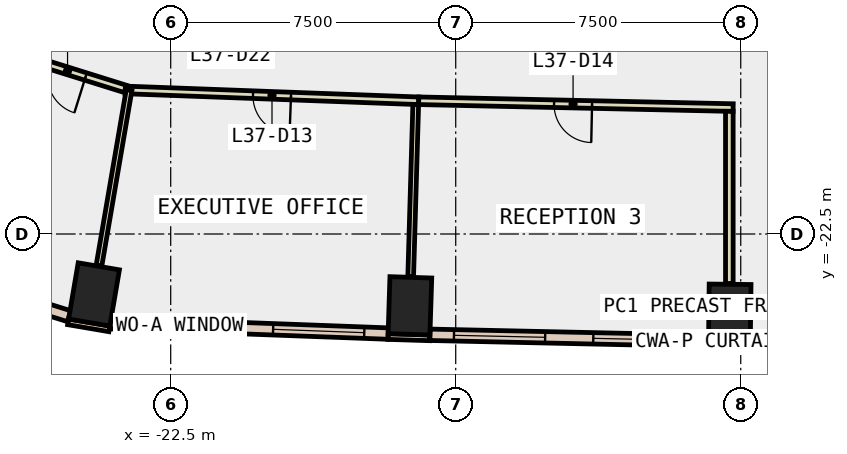
"""IFC4 building model, lengths in metres.
Left out: names, types, materials, properties, quantities, classifications, styles, units other than length and angle.
Written with IfcOpenShell. Run it as: python <this file> out.ifc"""

import sys

from ifc_helpers import new_model, si_unit, direction, frame, frame_2d, origin, origin_2d, place, context, subcontext, project, spatial, rectangle, extrude, element, fill, save


model = new_model("IFC4")
c1 = context("Model", 3, precision=1e-05, world=origin(), true_north=direction((0.0, 1.0)))
c2 = subcontext(c1, "Body", "Model", "MODEL_VIEW")
j1 = project(units=[si_unit("LENGTHUNIT", "METRE"), si_unit("PLANEANGLEUNIT", "RADIAN")], contexts=[c1])
p1 = place(None, origin())
s1 = spatial("IfcSite", under=j1, at=p1, CompositionType="ELEMENT")
p2 = place(p1, origin())
s2 = spatial("IfcBuilding", under=s1, at=p2, CompositionType="ELEMENT")
p3 = place(p2, frame((0.0, 0.0, 167.6)))
s3 = spatial("IfcBuildingStorey", under=s2, at=p3, CompositionType="ELEMENT", Elevation=167.6)
for number, where, z_axis, x_axis in (
    (1, (-24.518, -24.09, -0.4), (0.0, 0.0, 1.0), (-0.986, 0.168, 0.0)),
    (2, (-16.205, -24.39, -0.4), (0.0, 0.0, 1.0), (-0.999, 0.032, 0.0)),
    (3, (-7.789, -24.573, -0.4), (0.0, 0.0, 1.0), (-1.0, 0.012, 0.0)),
):
    element("IfcColumn", number, at=place(p3, frame(where, z_axis=z_axis, x_axis=x_axis)), inside=s3, PredefinedType="COLUMN", context=c2, shape_type="SweptSolid", body=[
        extrude(rectangle(XDim=1.1, YDim=1.5, at=origin_2d()), origin(), (0.0, 0.0, 1.0), 4.2),
    ])
p4 = place(p3, frame((-25.199, -24.811, 0.0), z_axis=(0.0, 0.0, 1.0), x_axis=(0.985763338892, -0.168138751323, 0.0)))
e4 = element("IfcWall", 4, at=p4, inside=s3, PredefinedType="STANDARD", context=c2, shape_type="SweptSolid", body=[
    extrude(rectangle(XDim=1.101, YDim=0.15, at=frame_2d((0.55, 0.0))), origin(), (0.0, 0.0, 1.0), 3.8),
])
p5 = place(p3, frame((-16.781, -25.198, 0.0), z_axis=(0.0, 0.0, 1.0), x_axis=(0.999523702549, -0.030860460829, 0.0)))
e5 = element("IfcWall", 5, at=p5, inside=s3, PredefinedType="STANDARD", context=c2, shape_type="SweptSolid", body=[
    extrude(rectangle(XDim=1.1, YDim=0.15, at=frame_2d((0.55, 0.0))), origin(), (0.0, 0.0, 1.0), 3.8),
])
p6 = place(p3, frame((-8.349, -25.392, 0.0), z_axis=(0.0, 0.0, 1.0), x_axis=(0.999940879068, -0.010873746799, 0.0)))
e6 = element("IfcWall", 6, at=p6, inside=s3, PredefinedType="STANDARD", context=c2, shape_type="SweptSolid", body=[
    extrude(rectangle(XDim=1.1, YDim=0.15, at=frame_2d((0.55, 0.0))), origin(), (0.0, 0.0, 1.0), 3.8),
])
p7 = place(p3, frame((-24.09, -24.848, 0.0), z_axis=(0.0, 0.0, 1.0), x_axis=(0.999307730926, -0.037202942236, 0.0)))
e7 = element("IfcWall", 7, at=p7, inside=s3, PredefinedType="STANDARD", context=c2, shape_type="SweptSolid", body=[
    extrude(rectangle(XDim=7.317, YDim=0.3, at=frame_2d((3.659, 0.0))), origin(), (0.0, 0.0, 1.0), 3.8),
])
p8 = place(p7, frame((0.629, 0.0, 0.9)))
e8 = element("IfcOpeningElement", 8, at=p8, cuts=e7, PredefinedType="OPENING", context=c2, shape_type="SweptSolid", body=[
    extrude(rectangle(XDim=2.4, YDim=2.6, at=frame_2d((1.2, 1.3))), frame((0.0, 0.16, 0.0), z_axis=(0.0, -1.0, 0.0), x_axis=(1.0, 0.0, 0.0)), (0.0, 0.0, 1.0), 0.32),
])
p9 = place(p7, frame((4.288, 0.0, 0.9)))
e9 = element("IfcOpeningElement", 9, at=p9, cuts=e7, PredefinedType="OPENING", context=c2, shape_type="SweptSolid", body=[
    extrude(rectangle(XDim=2.4, YDim=2.6, at=frame_2d((1.2, 1.3))), frame((0.0, 0.16, 0.0), z_axis=(0.0, -1.0, 0.0), x_axis=(1.0, 0.0, 0.0)), (0.0, 0.0, 1.0), 0.32),
])
p10 = place(p3, frame((-15.68, -25.152, 0.0), z_axis=(0.0, 0.0, 1.0), x_axis=(0.999765201774, -0.021668902196, 0.0)))
e10 = element("IfcWall", 10, at=p10, inside=s3, PredefinedType="STANDARD", context=c2, shape_type="SweptSolid", body=[
    extrude(rectangle(XDim=7.335, YDim=0.3, at=frame_2d((3.667, 0.0))), origin(), (0.0, 0.0, 1.0), 3.8),
])
p11 = place(p10, frame((0.634, 0.0, 0.9)))
e11 = element("IfcOpeningElement", 11, at=p11, cuts=e10, PredefinedType="OPENING", context=c2, shape_type="SweptSolid", body=[
    extrude(rectangle(XDim=2.4, YDim=2.6, at=frame_2d((1.2, 1.3))), frame((0.0, 0.16, 0.0), z_axis=(0.0, -1.0, 0.0), x_axis=(1.0, 0.0, 0.0)), (0.0, 0.0, 1.0), 0.32),
])
p12 = place(p10, frame((4.301, 0.0, 0.9)))
e12 = element("IfcOpeningElement", 12, at=p12, cuts=e10, PredefinedType="OPENING", context=c2, shape_type="SweptSolid", body=[
    extrude(rectangle(XDim=2.4, YDim=2.6, at=frame_2d((1.2, 1.3))), frame((0.0, 0.16, 0.0), z_axis=(0.0, -1.0, 0.0), x_axis=(1.0, 0.0, 0.0)), (0.0, 0.0, 1.0), 0.32),
])
p13 = place(p3, frame((-29.298, -23.376, 0.0), z_axis=(0.0, 0.0, 1.0), x_axis=(0.954628614874, -0.29779893832, 0.0)))
e13 = element("IfcWall", 13, at=p13, inside=s3, PredefinedType="STANDARD", context=c2, shape_type="SweptSolid", body=[
    extrude(rectangle(XDim=4.322, YDim=0.3, at=frame_2d((2.161, 0.0))), origin(), (0.0, 0.0, 1.0), 3.8),
])
p14 = place(p13, frame((1.461, 0.0, 0.9)))
e14 = element("IfcOpeningElement", 14, at=p14, cuts=e13, PredefinedType="OPENING", context=c2, shape_type="SweptSolid", body=[
    extrude(rectangle(XDim=1.4, YDim=2.6, at=frame_2d((0.7, 1.3))), frame((0.0, 0.16, 0.0), z_axis=(0.0, -1.0, 0.0), x_axis=(1.0, 0.0, 0.0)), (0.0, 0.0, 1.0), 0.32),
])
p15 = place(p3, frame((-23.691, -18.683, 0.0), z_axis=(0.0, 0.0, 1.0), x_axis=(-0.954546657381, 0.298061535398, 0.0)))
e15 = element("IfcWall", 15, at=p15, inside=s3, PredefinedType="PARTITIONING", context=c2, shape_type="SweptSolid", body=[
    extrude(rectangle(XDim=3.191, YDim=0.2, at=frame_2d((1.596, 0.0))), origin(), (0.0, 0.0, 1.0), 3.8),
])
p16 = place(p15, frame((1.096, 0.0, 0.0)))
e16 = element("IfcOpeningElement", 16, at=p16, cuts=e15, PredefinedType="OPENING", context=c2, shape_type="SweptSolid", body=[
    extrude(rectangle(XDim=1.0, YDim=2.1, at=frame_2d((0.5, 1.05))), frame((0.0, 0.11, 0.0), z_axis=(0.0, -1.0, 0.0), x_axis=(1.0, 0.0, 0.0)), (0.0, 0.0, 1.0), 0.22),
])
p17 = place(p3, frame((-15.974, -18.995, 0.0), z_axis=(0.0, 0.0, 1.0), x_axis=(-0.999314011084, 0.037033866276, 0.0)))
e17 = element("IfcWall", 17, at=p17, inside=s3, PredefinedType="PARTITIONING", context=c2, shape_type="SweptSolid", body=[
    extrude(rectangle(XDim=7.726, YDim=0.2, at=frame_2d((3.863, 0.0))), origin(), (0.0, 0.0, 1.0), 3.8),
])
p18 = place(p17, frame((3.363, 0.0, 0.0)))
e18 = element("IfcOpeningElement", 18, at=p18, cuts=e17, PredefinedType="OPENING", context=c2, shape_type="SweptSolid", body=[
    extrude(rectangle(XDim=1.0, YDim=2.1, at=frame_2d((0.5, 1.05))), frame((0.0, 0.11, 0.0), z_axis=(0.0, -1.0, 0.0), x_axis=(1.0, 0.0, 0.0)), (0.0, 0.0, 1.0), 0.22),
])
p19 = place(p3, frame((-7.7, -19.174, 0.0), z_axis=(0.0, 0.0, 1.0), x_axis=(-0.999762993889, 0.02177053169, 0.0)))
e19 = element("IfcWall", 19, at=p19, inside=s3, PredefinedType="PARTITIONING", context=c2, shape_type="SweptSolid", body=[
    extrude(rectangle(XDim=8.276, YDim=0.2, at=frame_2d((4.138, 0.0))), origin(), (0.0, 0.0, 1.0), 3.8),
])
p20 = place(p19, frame((3.713, 0.0, 0.0)))
e20 = element("IfcOpeningElement", 20, at=p20, cuts=e19, PredefinedType="OPENING", context=c2, shape_type="SweptSolid", body=[
    extrude(rectangle(XDim=1.0, YDim=2.1, at=frame_2d((0.5, 1.05))), frame((0.0, 0.11, 0.0), z_axis=(0.0, -1.0, 0.0), x_axis=(1.0, 0.0, 0.0)), (0.0, 0.0, 1.0), 0.22),
])
p21 = place(p3, frame((-7.8, -23.803, 0.0), z_axis=(0.0, 0.0, 1.0), x_axis=(0.0, 1.0, 0.0)))
e21 = element("IfcWall", 21, at=p21, inside=s3, PredefinedType="PARTITIONING", context=c2, shape_type="SweptSolid", body=[
    extrude(rectangle(XDim=4.531, YDim=0.2, at=frame_2d((2.266, 0.0))), origin(), (0.0, 0.0, 1.0), 3.8),
])
p22 = place(p3, frame((-23.595, -18.712, 0.0), z_axis=(0.0, 0.0, 1.0), x_axis=(-0.168992733164, -0.985617296996, 0.0)))
e22 = element("IfcWall", 22, at=p22, inside=s3, PredefinedType="PARTITIONING", context=c2, shape_type="SweptSolid", body=[
    extrude(rectangle(XDim=4.687, YDim=0.15, at=frame_2d((2.343, 0.0))), origin(), (0.0, 0.0, 1.0), 3.8),
])
p23 = place(p3, frame((-16.052, -19.092, 0.0), z_axis=(0.0, 0.0, 1.0), x_axis=(-0.029372127975, -0.999568545973, 0.0)))
e23 = element("IfcWall", 23, at=p23, inside=s3, PredefinedType="PARTITIONING", context=c2, shape_type="SweptSolid", body=[
    extrude(rectangle(XDim=4.53, YDim=0.15, at=frame_2d((2.265, 0.0))), origin(), (0.0, 0.0, 1.0), 3.8),
])
p24 = place(p8, origin())
e24 = element("IfcWindow", 24, at=p24, inside=s3, PartitioningType="SINGLE_PANEL", PredefinedType="WINDOW", context=c2, shape_type="SweptSolid", body=[
    extrude(rectangle(XDim=2.4, YDim=2.6, at=frame_2d((1.2, 1.3))), frame((0.0, 0.03, 0.0), z_axis=(0.0, -1.0, 0.0), x_axis=(1.0, 0.0, 0.0)), (0.0, 0.0, 1.0), 0.06),
])
fill(e8, e24)
p25 = place(p9, origin())
e25 = element("IfcWindow", 25, at=p25, inside=s3, PartitioningType="SINGLE_PANEL", PredefinedType="WINDOW", context=c2, shape_type="SweptSolid", body=[
    extrude(rectangle(XDim=2.4, YDim=2.6, at=frame_2d((1.2, 1.3))), frame((0.0, 0.03, 0.0), z_axis=(0.0, -1.0, 0.0), x_axis=(1.0, 0.0, 0.0)), (0.0, 0.0, 1.0), 0.06),
])
fill(e9, e25)
p26 = place(p11, origin())
e26 = element("IfcWindow", 26, at=p26, inside=s3, PartitioningType="SINGLE_PANEL", PredefinedType="WINDOW", context=c2, shape_type="SweptSolid", body=[
    extrude(rectangle(XDim=2.4, YDim=2.6, at=frame_2d((1.2, 1.3))), frame((0.0, 0.03, 0.0), z_axis=(0.0, -1.0, 0.0), x_axis=(1.0, 0.0, 0.0)), (0.0, 0.0, 1.0), 0.06),
])
fill(e11, e26)
p27 = place(p12, origin())
e27 = element("IfcWindow", 27, at=p27, inside=s3, PartitioningType="SINGLE_PANEL", PredefinedType="WINDOW", context=c2, shape_type="SweptSolid", body=[
    extrude(rectangle(XDim=2.4, YDim=2.6, at=frame_2d((1.2, 1.3))), frame((0.0, 0.03, 0.0), z_axis=(0.0, -1.0, 0.0), x_axis=(1.0, 0.0, 0.0)), (0.0, 0.0, 1.0), 0.06),
])
fill(e12, e27)
p28 = place(p16, origin())
e28 = element("IfcDoor", 28, at=p28, inside=s3, OperationType="SINGLE_SWING_LEFT", PredefinedType="DOOR", context=c2, shape_type="SweptSolid", body=[
    extrude(rectangle(XDim=1.0, YDim=2.1, at=frame_2d((0.5, 1.05))), frame((0.0, 0.025, 0.0), z_axis=(0.0, -1.0, 0.0), x_axis=(1.0, 0.0, 0.0)), (0.0, 0.0, 1.0), 0.05),
])
fill(e16, e28)
p29 = place(p18, origin())
e29 = element("IfcDoor", 29, at=p29, inside=s3, OperationType="SINGLE_SWING_LEFT", PredefinedType="DOOR", context=c2, shape_type="SweptSolid", body=[
    extrude(rectangle(XDim=1.0, YDim=2.1, at=frame_2d((0.5, 1.05))), frame((0.0, 0.025, 0.0), z_axis=(0.0, -1.0, 0.0), x_axis=(1.0, 0.0, 0.0)), (0.0, 0.0, 1.0), 0.05),
])
fill(e18, e29)
p30 = place(p20, origin())
e30 = element("IfcDoor", 30, at=p30, inside=s3, OperationType="SINGLE_SWING_RIGHT", PredefinedType="DOOR", context=c2, shape_type="SweptSolid", body=[
    extrude(rectangle(XDim=1.0, YDim=2.1, at=frame_2d((0.5, 1.05))), frame((0.0, 0.025, 0.0), z_axis=(0.0, -1.0, 0.0), x_axis=(1.0, 0.0, 0.0)), (0.0, 0.0, 1.0), 0.05),
])
fill(e20, e30)
save(model, sys.argv[1])
